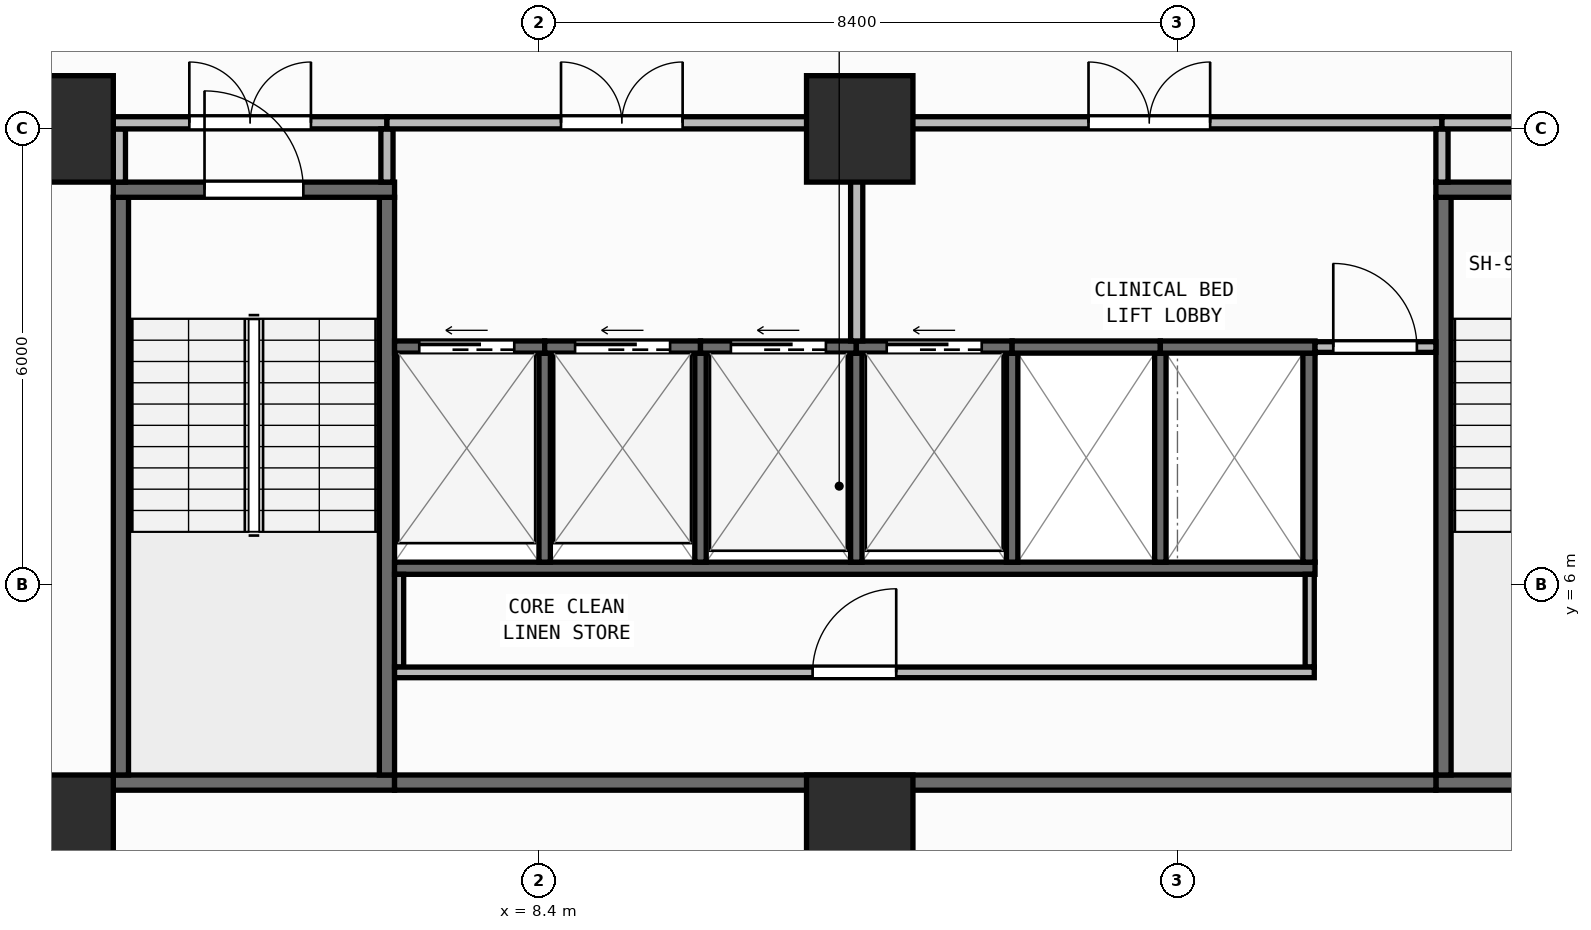
"""IFC4 building model, lengths in metres.
Left out: names, types, materials, properties, quantities, classifications, styles, units other than length and angle.
Written with IfcOpenShell. Run it as: python <this file> out.ifc"""

import sys

from ifc_helpers import new_model, si_unit, direction, frame, frame_2d, origin, origin_2d, place, context, subcontext, project, spatial, rectangle, extrude, element, fill, save


model = new_model("IFC4")
c1 = context("Model", 3, precision=1e-05, world=origin(), true_north=direction((0.0, 1.0)))
c2 = subcontext(c1, "Body", "Model", "MODEL_VIEW")
j1 = project(units=[si_unit("LENGTHUNIT", "METRE"), si_unit("PLANEANGLEUNIT", "RADIAN")], contexts=[c1])
p1 = place(None, origin())
s1 = spatial("IfcSite", under=j1, at=p1, CompositionType="ELEMENT")
p2 = place(p1, origin())
s2 = spatial("IfcBuilding", under=s1, at=p2, CompositionType="ELEMENT")
p3 = place(p2, frame((0.0, 0.0, 85.7)))
s3 = spatial("IfcBuildingStorey", under=s2, at=p3, CompositionType="ELEMENT", Elevation=85.7)
for number, where, z_axis, x_axis in (
    (1, (2.1, 2.8, 0.0), (0.0, 0.0, 1.0), (1.0, 0.0, 0.0)),
    (2, (12.62, 2.8, 0.0), (0.0, 0.0, 1.0), (1.0, 0.0, 0.0)),
    (3, (2.1, 12.0, 0.0), (0.0, 0.0, 1.0), (1.0, 0.0, 0.0)),
    (4, (12.62, 12.0, 0.0), (0.0, 0.0, 1.0), (1.0, 0.0, 0.0)),
):
    element("IfcColumn", number, at=place(p3, frame(where, z_axis=z_axis, x_axis=x_axis)), inside=s3, PredefinedType="COLUMN", context=c2, shape_type="SweptSolid", body=[
        extrude(rectangle(XDim=1.4, YDim=1.4, at=origin_2d()), origin(), (0.0, 0.0, 1.0), 3.95),
    ])
p4 = place(p3, frame((2.76, 0.174, 0.0), z_axis=(0.0, 0.0, 1.0), x_axis=(0.996571478456, 0.082736257641, 0.0)))
e5 = element("IfcWall", 5, at=p4, inside=s3, PredefinedType="STANDARD", context=c2, shape_type="SweptSolid", body=[
    extrude(rectangle(XDim=52.861, YDim=0.26, at=frame_2d((26.431, 0.0))), origin(), (0.0, 0.0, 1.0), 3.71),
])
p5 = place(p4, frame((25.231, 0.0, 0.9)))
e6 = element("IfcOpeningElement", 6, at=p5, cuts=e5, PredefinedType="OPENING", context=c2, shape_type="SweptSolid", body=[
    extrude(rectangle(XDim=2.4, YDim=1.65, at=frame_2d((1.2, 0.825))), frame((0.0, 0.14, 0.0), z_axis=(0.0, -1.0, 0.0), x_axis=(1.0, 0.0, 0.0)), (0.0, 0.0, 1.0), 0.28),
])
p6 = place(p3, frame((2.8, 3.4, 0.0), z_axis=(0.0, 0.0, 1.0), x_axis=(1.0, 0.0, 0.0)))
e7 = element("IfcWall", 7, at=p6, inside=s3, PredefinedType="SHEAR", context=c2, shape_type="SweptSolid", body=[
    extrude(rectangle(XDim=3.7, YDim=0.2, at=frame_2d((1.85, 0.0))), origin(), (0.0, 0.0, 1.0), 3.71),
])
for number, where, z_axis, x_axis in (
    (8, (2.9, 3.5, 0.0), (0.0, 0.0, 1.0), (0.0, 1.0, 0.0)),
    (9, (6.4, 3.5, 0.0), (0.0, 0.0, 1.0), (0.0, 1.0, 0.0)),
):
    element("IfcWall", number, at=place(p3, frame(where, z_axis=z_axis, x_axis=x_axis)), inside=s3, PredefinedType="SHEAR", context=c2, shape_type="SweptSolid", body=[
        extrude(rectangle(XDim=7.6, YDim=0.2, at=frame_2d((3.8, 0.0))), origin(), (0.0, 0.0, 1.0), 3.71),
    ])
p7 = place(p3, frame((2.8, 11.2, 0.0), z_axis=(0.0, 0.0, 1.0), x_axis=(1.0, 0.0, 0.0)))
e10 = element("IfcWall", 10, at=p7, inside=s3, PredefinedType="SHEAR", context=c2, shape_type="SweptSolid", body=[
    extrude(rectangle(XDim=3.7, YDim=0.2, at=frame_2d((1.85, 0.0))), origin(), (0.0, 0.0, 1.0), 3.71),
])
p8 = place(p7, frame((1.2, 0.0, 0.0)))
e11 = element("IfcOpeningElement", 11, at=p8, cuts=e10, PredefinedType="OPENING", context=c2, shape_type="SweptSolid", body=[
    extrude(rectangle(XDim=1.3, YDim=2.15, at=frame_2d((0.65, 1.075))), frame((0.0, 0.11, 0.0), z_axis=(0.0, -1.0, 0.0), x_axis=(1.0, 0.0, 0.0)), (0.0, 0.0, 1.0), 0.22),
])
p9 = place(p3, frame((20.2, 3.4, 0.0), z_axis=(0.0, 0.0, 1.0), x_axis=(1.0, 0.0, 0.0)))
e12 = element("IfcWall", 12, at=p9, inside=s3, PredefinedType="SHEAR", context=c2, shape_type="SweptSolid", body=[
    extrude(rectangle(XDim=3.7, YDim=0.2, at=frame_2d((1.85, 0.0))), origin(), (0.0, 0.0, 1.0), 3.71),
])
p10 = place(p3, frame((20.3, 3.5, 0.0), z_axis=(0.0, 0.0, 1.0), x_axis=(0.0, 1.0, 0.0)))
e13 = element("IfcWall", 13, at=p10, inside=s3, PredefinedType="SHEAR", context=c2, shape_type="SweptSolid", body=[
    extrude(rectangle(XDim=7.6, YDim=0.2, at=frame_2d((3.8, 0.0))), origin(), (0.0, 0.0, 1.0), 3.71),
])
p11 = place(p3, frame((20.2, 11.2, 0.0), z_axis=(0.0, 0.0, 1.0), x_axis=(1.0, 0.0, 0.0)))
e14 = element("IfcWall", 14, at=p11, inside=s3, PredefinedType="SHEAR", context=c2, shape_type="SweptSolid", body=[
    extrude(rectangle(XDim=3.7, YDim=0.2, at=frame_2d((1.85, 0.0))), origin(), (0.0, 0.0, 1.0), 3.71),
])
p12 = place(p11, frame((1.2, 0.0, 0.0)))
e15 = element("IfcOpeningElement", 15, at=p12, cuts=e14, PredefinedType="OPENING", context=c2, shape_type="SweptSolid", body=[
    extrude(rectangle(XDim=1.3, YDim=2.15, at=frame_2d((0.65, 1.075))), frame((0.0, 0.11, 0.0), z_axis=(0.0, -1.0, 0.0), x_axis=(1.0, 0.0, 0.0)), (0.0, 0.0, 1.0), 0.22),
])
p13 = place(p3, frame((6.5, 3.4, 0.0), z_axis=(0.0, 0.0, 1.0), x_axis=(1.0, 0.0, 0.0)))
e16 = element("IfcWall", 16, at=p13, inside=s3, PredefinedType="SHEAR", context=c2, shape_type="SweptSolid", body=[
    extrude(rectangle(XDim=13.7, YDim=0.2, at=frame_2d((6.85, 0.0))), origin(), (0.0, 0.0, 1.0), 3.71),
])
p14 = place(p3, frame((6.5, 6.22, 0.0), z_axis=(0.0, 0.0, 1.0), x_axis=(1.0, 0.0, 0.0)))
e17 = element("IfcWall", 17, at=p14, inside=s3, PredefinedType="SHEAR", context=c2, shape_type="SweptSolid", body=[
    extrude(rectangle(XDim=12.11, YDim=0.16, at=frame_2d((6.055, 0.0))), origin(), (0.0, 0.0, 1.0), 3.71),
])
p15 = place(p3, frame((18.53, 6.3, 0.0), z_axis=(0.0, 0.0, 1.0), x_axis=(0.0, 1.0, 0.0)))
e18 = element("IfcWall", 18, at=p15, inside=s3, PredefinedType="SHEAR", context=c2, shape_type="SweptSolid", body=[
    extrude(rectangle(XDim=2.75, YDim=0.16, at=frame_2d((1.375, 0.0))), origin(), (0.0, 0.0, 1.0), 3.71),
])
for number, where, z_axis, x_axis in (
    (19, (8.475, 6.3, 0.0), (0.0, 0.0, 1.0), (0.0, 1.0, 0.0)),
    (20, (10.525, 6.3, 0.0), (0.0, 0.0, 1.0), (0.0, 1.0, 0.0)),
    (21, (12.575, 6.3, 0.0), (0.0, 0.0, 1.0), (0.0, 1.0, 0.0)),
    (22, (14.625, 6.3, 0.0), (0.0, 0.0, 1.0), (0.0, 1.0, 0.0)),
    (23, (16.575, 6.3, 0.0), (0.0, 0.0, 1.0), (0.0, 1.0, 0.0)),
):
    element("IfcWall", number, at=place(p3, frame(where, z_axis=z_axis, x_axis=x_axis)), inside=s3, PredefinedType="SHEAR", context=c2, shape_type="SweptSolid", body=[
        extrude(rectangle(XDim=2.75, YDim=0.15, at=frame_2d((1.375, 0.0))), origin(), (0.0, 0.0, 1.0), 3.71),
    ])
p16 = place(p3, frame((6.5, 9.13, 0.0), z_axis=(0.0, 0.0, 1.0), x_axis=(1.0, 0.0, 0.0)))
e24 = element("IfcWall", 24, at=p16, inside=s3, PredefinedType="SHEAR", context=c2, shape_type="SweptSolid", body=[
    extrude(rectangle(XDim=1.975, YDim=0.16, at=frame_2d((0.988, 0.0))), origin(), (0.0, 0.0, 1.0), 3.71),
])
p17 = place(p16, frame((0.325, 0.0, 0.0)))
e25 = element("IfcOpeningElement", 25, at=p17, cuts=e24, PredefinedType="OPENING", context=c2, shape_type="SweptSolid", body=[
    extrude(rectangle(XDim=1.25, YDim=2.15, at=frame_2d((0.625, 1.075))), frame((0.0, 0.09, 0.0), z_axis=(0.0, -1.0, 0.0), x_axis=(1.0, 0.0, 0.0)), (0.0, 0.0, 1.0), 0.18),
])
p18 = place(p3, frame((8.475, 9.13, 0.0), z_axis=(0.0, 0.0, 1.0), x_axis=(1.0, 0.0, 0.0)))
e26 = element("IfcWall", 26, at=p18, inside=s3, PredefinedType="SHEAR", context=c2, shape_type="SweptSolid", body=[
    extrude(rectangle(XDim=2.05, YDim=0.16, at=frame_2d((1.025, 0.0))), origin(), (0.0, 0.0, 1.0), 3.71),
])
p19 = place(p18, frame((0.4, 0.0, 0.0)))
e27 = element("IfcOpeningElement", 27, at=p19, cuts=e26, PredefinedType="OPENING", context=c2, shape_type="SweptSolid", body=[
    extrude(rectangle(XDim=1.25, YDim=2.15, at=frame_2d((0.625, 1.075))), frame((0.0, 0.09, 0.0), z_axis=(0.0, -1.0, 0.0), x_axis=(1.0, 0.0, 0.0)), (0.0, 0.0, 1.0), 0.18),
])
p20 = place(p3, frame((10.525, 9.13, 0.0), z_axis=(0.0, 0.0, 1.0), x_axis=(1.0, 0.0, 0.0)))
e28 = element("IfcWall", 28, at=p20, inside=s3, PredefinedType="SHEAR", context=c2, shape_type="SweptSolid", body=[
    extrude(rectangle(XDim=2.05, YDim=0.16, at=frame_2d((1.025, 0.0))), origin(), (0.0, 0.0, 1.0), 3.71),
])
p21 = place(p20, frame((0.4, 0.0, 0.0)))
e29 = element("IfcOpeningElement", 29, at=p21, cuts=e28, PredefinedType="OPENING", context=c2, shape_type="SweptSolid", body=[
    extrude(rectangle(XDim=1.25, YDim=2.15, at=frame_2d((0.625, 1.075))), frame((0.0, 0.09, 0.0), z_axis=(0.0, -1.0, 0.0), x_axis=(1.0, 0.0, 0.0)), (0.0, 0.0, 1.0), 0.18),
])
p22 = place(p3, frame((12.575, 9.13, 0.0), z_axis=(0.0, 0.0, 1.0), x_axis=(1.0, 0.0, 0.0)))
e30 = element("IfcWall", 30, at=p22, inside=s3, PredefinedType="SHEAR", context=c2, shape_type="SweptSolid", body=[
    extrude(rectangle(XDim=2.05, YDim=0.16, at=frame_2d((1.025, 0.0))), origin(), (0.0, 0.0, 1.0), 3.71),
])
p23 = place(p22, frame((0.4, 0.0, 0.0)))
e31 = element("IfcOpeningElement", 31, at=p23, cuts=e30, PredefinedType="OPENING", context=c2, shape_type="SweptSolid", body=[
    extrude(rectangle(XDim=1.25, YDim=2.15, at=frame_2d((0.625, 1.075))), frame((0.0, 0.09, 0.0), z_axis=(0.0, -1.0, 0.0), x_axis=(1.0, 0.0, 0.0)), (0.0, 0.0, 1.0), 0.18),
])
p24 = place(p3, frame((14.625, 9.13, 0.0), z_axis=(0.0, 0.0, 1.0), x_axis=(1.0, 0.0, 0.0)))
e32 = element("IfcWall", 32, at=p24, inside=s3, PredefinedType="SHEAR", context=c2, shape_type="SweptSolid", body=[
    extrude(rectangle(XDim=1.95, YDim=0.16, at=frame_2d((0.975, 0.0))), origin(), (0.0, 0.0, 1.0), 3.71),
])
p25 = place(p3, frame((16.575, 9.13, 0.0), z_axis=(0.0, 0.0, 1.0), x_axis=(1.0, 0.0, 0.0)))
e33 = element("IfcWall", 33, at=p25, inside=s3, PredefinedType="SHEAR", context=c2, shape_type="SweptSolid", body=[
    extrude(rectangle(XDim=2.035, YDim=0.16, at=frame_2d((1.018, 0.0))), origin(), (0.0, 0.0, 1.0), 3.71),
])
for number, where, z_axis, x_axis in (
    (34, (6.56, 4.92, 0.0), (0.0, 0.0, 1.0), (0.0, 1.0, 0.0)),
    (35, (18.54, 4.92, 0.0), (0.0, 0.0, 1.0), (0.0, 1.0, 0.0)),
):
    element("IfcWall", number, at=place(p3, frame(where, z_axis=z_axis, x_axis=x_axis)), inside=s3, PredefinedType="PARTITIONING", context=c2, shape_type="SweptSolid", body=[
        extrude(rectangle(XDim=1.22, YDim=0.12, at=frame_2d((0.61, 0.0))), origin(), (0.0, 0.0, 1.0), 3.71),
    ])
p26 = place(p3, frame((6.5, 4.85, 0.0), z_axis=(0.0, 0.0, 1.0), x_axis=(1.0, 0.0, 0.0)))
e36 = element("IfcWall", 36, at=p26, inside=s3, PredefinedType="PARTITIONING", context=c2, shape_type="SweptSolid", body=[
    extrude(rectangle(XDim=12.1, YDim=0.14, at=frame_2d((6.05, 0.0))), origin(), (0.0, 0.0, 1.0), 3.71),
])
p27 = place(p26, frame((5.5, 0.0, 0.0)))
e37 = element("IfcOpeningElement", 37, at=p27, cuts=e36, PredefinedType="OPENING", context=c2, shape_type="SweptSolid", body=[
    extrude(rectangle(XDim=1.1, YDim=2.1, at=frame_2d((0.55, 1.05))), frame((0.0, 0.08, 0.0), z_axis=(0.0, -1.0, 0.0), x_axis=(1.0, 0.0, 0.0)), (0.0, 0.0, 1.0), 0.16),
])
p28 = place(p3, frame((18.61, 9.13, 0.0), z_axis=(0.0, 0.0, 1.0), x_axis=(1.0, 0.0, 0.0)))
e38 = element("IfcWall", 38, at=p28, inside=s3, PredefinedType="PARTITIONING", context=c2, shape_type="SweptSolid", body=[
    extrude(rectangle(XDim=1.59, YDim=0.14, at=frame_2d((0.795, 0.0))), origin(), (0.0, 0.0, 1.0), 3.71),
])
p29 = place(p28, frame((0.24, 0.0, 0.0)))
e39 = element("IfcOpeningElement", 39, at=p29, cuts=e38, PredefinedType="OPENING", context=c2, shape_type="SweptSolid", body=[
    extrude(rectangle(XDim=1.1, YDim=2.1, at=frame_2d((0.55, 1.05))), frame((0.0, 0.08, 0.0), z_axis=(0.0, -1.0, 0.0), x_axis=(1.0, 0.0, 0.0)), (0.0, 0.0, 1.0), 0.16),
])
p30 = place(p3, frame((2.88, 11.3, 0.0), z_axis=(0.0, 0.0, 1.0), x_axis=(0.0, 1.0, 0.0)))
e40 = element("IfcWall", 40, at=p30, inside=s3, PredefinedType="PARTITIONING", context=c2, shape_type="SweptSolid", body=[
    extrude(rectangle(XDim=0.7, YDim=0.16, at=frame_2d((0.35, 0.0))), origin(), (0.0, 0.0, 1.0), 3.71),
])
p31 = place(p3, frame((2.8, 12.08, 0.0), z_axis=(0.0, 0.0, 1.0), x_axis=(1.0, 0.0, 0.0)))
e41 = element("IfcWall", 41, at=p31, inside=s3, PredefinedType="PARTITIONING", context=c2, shape_type="SweptSolid", body=[
    extrude(rectangle(XDim=3.6, YDim=0.16, at=frame_2d((1.8, 0.0))), origin(), (0.0, 0.0, 1.0), 3.073),
])
p32 = place(p31, frame((1.0, 0.0, 0.0)))
e42 = element("IfcOpeningElement", 42, at=p32, cuts=e41, PredefinedType="OPENING", context=c2, shape_type="SweptSolid", body=[
    extrude(rectangle(XDim=1.6, YDim=2.05, at=frame_2d((0.8, 1.025))), frame((0.0, 0.09, 0.0), z_axis=(0.0, -1.0, 0.0), x_axis=(1.0, 0.0, 0.0)), (0.0, 0.0, 1.0), 0.18),
])
p33 = place(p3, frame((6.4, 11.3, 0.0), z_axis=(0.0, 0.0, 1.0), x_axis=(0.0, 1.0, 0.0)))
e43 = element("IfcWall", 43, at=p33, inside=s3, PredefinedType="PARTITIONING", context=c2, shape_type="SweptSolid", body=[
    extrude(rectangle(XDim=0.7, YDim=0.16, at=frame_2d((0.35, 0.0))), origin(), (0.0, 0.0, 1.0), 3.71),
])
p34 = place(p3, frame((6.4, 12.08, 0.0), z_axis=(0.0, 0.0, 1.0), x_axis=(1.0, 0.0, 0.0)))
e44 = element("IfcWall", 44, at=p34, inside=s3, PredefinedType="PARTITIONING", context=c2, shape_type="SweptSolid", body=[
    extrude(rectangle(XDim=6.18, YDim=0.16, at=frame_2d((3.09, 0.0))), origin(), (0.0, 0.0, 1.0), 3.073),
])
p35 = place(p34, frame((2.29, 0.0, 0.0)))
e45 = element("IfcOpeningElement", 45, at=p35, cuts=e44, PredefinedType="OPENING", context=c2, shape_type="SweptSolid", body=[
    extrude(rectangle(XDim=1.6, YDim=2.05, at=frame_2d((0.8, 1.025))), frame((0.0, 0.09, 0.0), z_axis=(0.0, -1.0, 0.0), x_axis=(1.0, 0.0, 0.0)), (0.0, 0.0, 1.0), 0.18),
])
p36 = place(p3, frame((12.58, 9.21, 0.0), z_axis=(0.0, 0.0, 1.0), x_axis=(0.0, 1.0, 0.0)))
e46 = element("IfcWall", 46, at=p36, inside=s3, PredefinedType="PARTITIONING", context=c2, shape_type="SweptSolid", body=[
    extrude(rectangle(XDim=2.79, YDim=0.16, at=frame_2d((1.395, 0.0))), origin(), (0.0, 0.0, 1.0), 3.71),
])
p37 = place(p3, frame((12.58, 12.08, 0.0), z_axis=(0.0, 0.0, 1.0), x_axis=(1.0, 0.0, 0.0)))
e47 = element("IfcWall", 47, at=p37, inside=s3, PredefinedType="PARTITIONING", context=c2, shape_type="SweptSolid", body=[
    extrude(rectangle(XDim=7.7, YDim=0.16, at=frame_2d((3.85, 0.0))), origin(), (0.0, 0.0, 1.0), 3.073),
])
p38 = place(p37, frame((3.05, 0.0, 0.0)))
e48 = element("IfcOpeningElement", 48, at=p38, cuts=e47, PredefinedType="OPENING", context=c2, shape_type="SweptSolid", body=[
    extrude(rectangle(XDim=1.6, YDim=2.05, at=frame_2d((0.8, 1.025))), frame((0.0, 0.09, 0.0), z_axis=(0.0, -1.0, 0.0), x_axis=(1.0, 0.0, 0.0)), (0.0, 0.0, 1.0), 0.18),
])
p39 = place(p3, frame((20.28, 11.3, 0.0), z_axis=(0.0, 0.0, 1.0), x_axis=(0.0, 1.0, 0.0)))
e49 = element("IfcWall", 49, at=p39, inside=s3, PredefinedType="PARTITIONING", context=c2, shape_type="SweptSolid", body=[
    extrude(rectangle(XDim=0.7, YDim=0.16, at=frame_2d((0.35, 0.0))), origin(), (0.0, 0.0, 1.0), 3.71),
])
p40 = place(p3, frame((20.28, 12.08, 0.0), z_axis=(0.0, 0.0, 1.0), x_axis=(1.0, 0.0, 0.0)))
e50 = element("IfcWall", 50, at=p40, inside=s3, PredefinedType="PARTITIONING", context=c2, shape_type="SweptSolid", body=[
    extrude(rectangle(XDim=3.62, YDim=0.16, at=frame_2d((1.81, 0.0))), origin(), (0.0, 0.0, 1.0), 3.073),
])
p41 = place(p40, frame((1.01, 0.0, 0.0)))
e51 = element("IfcOpeningElement", 51, at=p41, cuts=e50, PredefinedType="OPENING", context=c2, shape_type="SweptSolid", body=[
    extrude(rectangle(XDim=1.6, YDim=2.05, at=frame_2d((0.8, 1.025))), frame((0.0, 0.09, 0.0), z_axis=(0.0, -1.0, 0.0), x_axis=(1.0, 0.0, 0.0)), (0.0, 0.0, 1.0), 0.18),
])
p42 = place(p8, origin())
e52 = element("IfcDoor", 52, at=p42, inside=s3, OperationType="SINGLE_SWING_LEFT", PredefinedType="DOOR", context=c2, shape_type="SweptSolid", body=[
    extrude(rectangle(XDim=1.3, YDim=2.15, at=frame_2d((0.65, 1.075))), frame((0.0, 0.025, 0.0), z_axis=(0.0, -1.0, 0.0), x_axis=(1.0, 0.0, 0.0)), (0.0, 0.0, 1.0), 0.05),
])
fill(e11, e52)
p43 = place(p17, origin())
e53 = element("IfcDoor", 53, at=p43, inside=s3, OperationType="SLIDING_TO_LEFT", PredefinedType="DOOR", context=c2, shape_type="SweptSolid", body=[
    extrude(rectangle(XDim=1.25, YDim=2.15, at=frame_2d((0.625, 1.075))), frame((0.0, 0.025, 0.0), z_axis=(0.0, -1.0, 0.0), x_axis=(1.0, 0.0, 0.0)), (0.0, 0.0, 1.0), 0.05),
])
fill(e25, e53)
p44 = place(p19, origin())
e54 = element("IfcDoor", 54, at=p44, inside=s3, OperationType="SLIDING_TO_LEFT", PredefinedType="DOOR", context=c2, shape_type="SweptSolid", body=[
    extrude(rectangle(XDim=1.25, YDim=2.15, at=frame_2d((0.625, 1.075))), frame((0.0, 0.025, 0.0), z_axis=(0.0, -1.0, 0.0), x_axis=(1.0, 0.0, 0.0)), (0.0, 0.0, 1.0), 0.05),
])
fill(e27, e54)
p45 = place(p21, origin())
e55 = element("IfcDoor", 55, at=p45, inside=s3, OperationType="SLIDING_TO_LEFT", PredefinedType="DOOR", context=c2, shape_type="SweptSolid", body=[
    extrude(rectangle(XDim=1.25, YDim=2.15, at=frame_2d((0.625, 1.075))), frame((0.0, 0.025, 0.0), z_axis=(0.0, -1.0, 0.0), x_axis=(1.0, 0.0, 0.0)), (0.0, 0.0, 1.0), 0.05),
])
fill(e29, e55)
p46 = place(p23, origin())
e56 = element("IfcDoor", 56, at=p46, inside=s3, OperationType="SLIDING_TO_LEFT", PredefinedType="DOOR", context=c2, shape_type="SweptSolid", body=[
    extrude(rectangle(XDim=1.25, YDim=2.15, at=frame_2d((0.625, 1.075))), frame((0.0, 0.025, 0.0), z_axis=(0.0, -1.0, 0.0), x_axis=(1.0, 0.0, 0.0)), (0.0, 0.0, 1.0), 0.05),
])
fill(e31, e56)
p47 = place(p27, origin())
e57 = element("IfcDoor", 57, at=p47, inside=s3, OperationType="SINGLE_SWING_RIGHT", PredefinedType="DOOR", context=c2, shape_type="SweptSolid", body=[
    extrude(rectangle(XDim=1.1, YDim=2.1, at=frame_2d((0.55, 1.05))), frame((0.0, 0.025, 0.0), z_axis=(0.0, -1.0, 0.0), x_axis=(1.0, 0.0, 0.0)), (0.0, 0.0, 1.0), 0.05),
])
fill(e37, e57)
p48 = place(p29, origin())
e58 = element("IfcDoor", 58, at=p48, inside=s3, OperationType="SINGLE_SWING_LEFT", PredefinedType="DOOR", context=c2, shape_type="SweptSolid", body=[
    extrude(rectangle(XDim=1.1, YDim=2.1, at=frame_2d((0.55, 1.05))), frame((0.0, 0.025, 0.0), z_axis=(0.0, -1.0, 0.0), x_axis=(1.0, 0.0, 0.0)), (0.0, 0.0, 1.0), 0.05),
])
fill(e39, e58)
p49 = place(p32, origin())
e59 = element("IfcDoor", 59, at=p49, inside=s3, OperationType="DOUBLE_DOOR_SINGLE_SWING", PredefinedType="DOOR", context=c2, shape_type="SweptSolid", body=[
    extrude(rectangle(XDim=1.6, YDim=2.05, at=frame_2d((0.8, 1.025))), frame((0.0, 0.025, 0.0), z_axis=(0.0, -1.0, 0.0), x_axis=(1.0, 0.0, 0.0)), (0.0, 0.0, 1.0), 0.05),
])
fill(e42, e59)
p50 = place(p35, origin())
e60 = element("IfcDoor", 60, at=p50, inside=s3, OperationType="DOUBLE_DOOR_SINGLE_SWING", PredefinedType="DOOR", context=c2, shape_type="SweptSolid", body=[
    extrude(rectangle(XDim=1.6, YDim=2.05, at=frame_2d((0.8, 1.025))), frame((0.0, 0.025, 0.0), z_axis=(0.0, -1.0, 0.0), x_axis=(1.0, 0.0, 0.0)), (0.0, 0.0, 1.0), 0.05),
])
fill(e45, e60)
p51 = place(p38, origin())
e61 = element("IfcDoor", 61, at=p51, inside=s3, OperationType="DOUBLE_DOOR_SINGLE_SWING", PredefinedType="DOOR", context=c2, shape_type="SweptSolid", body=[
    extrude(rectangle(XDim=1.6, YDim=2.05, at=frame_2d((0.8, 1.025))), frame((0.0, 0.025, 0.0), z_axis=(0.0, -1.0, 0.0), x_axis=(1.0, 0.0, 0.0)), (0.0, 0.0, 1.0), 0.05),
])
fill(e48, e61)
save(model, sys.argv[1])
